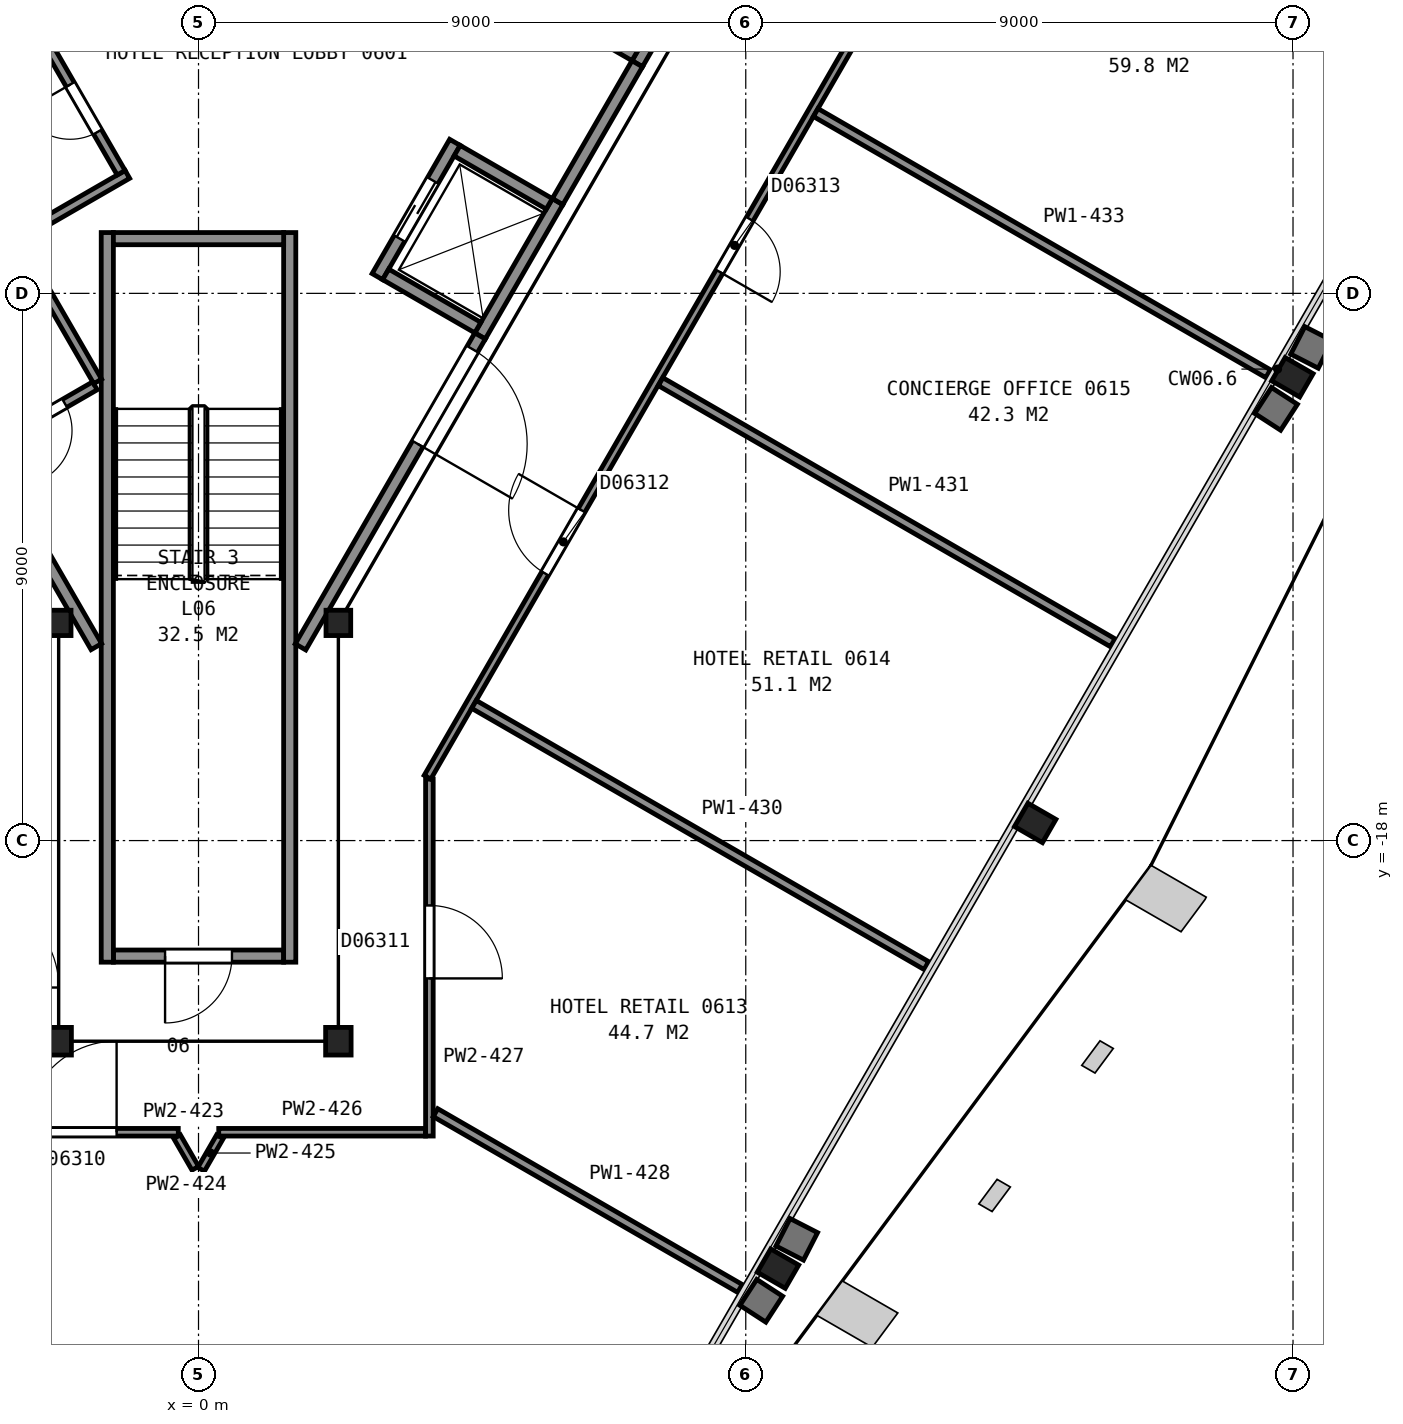
"""IFC4 building model, lengths in metres.
Left out: names, types, materials, properties, quantities, classifications, styles, units other than length and angle.
Written with IfcOpenShell. Run it as: python <this file> out.ifc"""

import sys

from ifc_helpers import new_model, si_unit, direction, frame, frame_2d, origin, origin_2d, place, context, subcontext, project, spatial, rectangle, i_section, extrude, element, fill, save


model = new_model("IFC4")
c1 = context("Model", 3, precision=1e-05, world=origin(), true_north=direction((0.0, 1.0)))
c2 = subcontext(c1, "Body", "Model", "MODEL_VIEW")
j1 = project(units=[si_unit("LENGTHUNIT", "METRE"), si_unit("PLANEANGLEUNIT", "RADIAN")], contexts=[c1])
p1 = place(None, origin())
s1 = spatial("IfcSite", under=j1, at=p1, CompositionType="ELEMENT")
p2 = place(p1, origin())
s2 = spatial("IfcBuilding", under=s1, at=p2, CompositionType="ELEMENT")
p3 = place(p2, frame((0.0, 0.0, 36.8)))
s3 = spatial("IfcBuildingStorey", under=s2, at=p3, CompositionType="ELEMENT", Elevation=36.8)
p4 = place(p3, frame((9.53, -25.04, 0.03), z_axis=(0.0, 0.0, 1.0), x_axis=(-0.5, -0.866025403784, 0.0)))
e1 = element("IfcColumn", 1, at=p4, inside=s3, PredefinedType="COLUMN", context=c2, shape_type="SweptSolid", body=[
    extrude(i_section(OverallWidth=0.442, OverallDepth=0.531, WebThickness=0.066, FlangeThickness=0.106, FilletRadius=0.015, at=origin_2d()), origin(), (0.0, 0.0, 1.0), 3.57),
])
for number, where, z_axis, x_axis in (
    (2, (13.76, -17.71, 0.025), (0.0, 0.0, 1.0), (-0.5, -0.866, 0.0)),
    (3, (17.99, -10.38, 0.025), (0.0, 0.0, 1.0), (-0.5, -0.866, 0.0)),
):
    element("IfcColumn", number, at=place(p3, frame(where, z_axis=z_axis, x_axis=x_axis)), inside=s3, PredefinedType="COLUMN", context=c2, shape_type="SweptSolid", body=[
        extrude(i_section(OverallWidth=0.442, OverallDepth=0.531, WebThickness=0.066, FlangeThickness=0.106, FilletRadius=0.015, at=origin_2d()), origin(), (0.0, 0.0, 1.0), 3.575),
    ])
p5 = place(p3, frame((-2.3, -14.42, 0.0), z_axis=(0.0, 0.0, 1.0), x_axis=(1.0, 0.0, 0.0)))
e4 = element("IfcColumn", 4, at=p5, inside=s3, PredefinedType="COLUMN", context=c2, shape_type="SweptSolid", body=[
    extrude(i_section(OverallWidth=0.406, OverallDepth=0.417, WebThickness=0.03, FlangeThickness=0.048, FilletRadius=0.015, at=origin_2d()), origin(), (0.0, 0.0, 1.0), 3.6),
])
for number, where, z_axis, x_axis in (
    (5, (-2.3, -21.3, 0.0), (0.0, 0.0, 1.0), (-1.0, 0.0, 0.0)),
    (6, (2.3, -21.3, 0.0), (0.0, 0.0, 1.0), (-1.0, 0.0, 0.0)),
):
    element("IfcColumn", number, at=place(p3, frame(where, z_axis=z_axis, x_axis=x_axis)), inside=s3, PredefinedType="COLUMN", context=c2, shape_type="SweptSolid", body=[
        extrude(i_section(OverallWidth=0.419, OverallDepth=0.455, WebThickness=0.042, FlangeThickness=0.068, FilletRadius=0.015, at=origin_2d()), origin(), (0.0, 0.0, 1.0), 3.6),
    ])
p6 = place(p3, frame((2.3, -14.42, 0.0), z_axis=(0.0, 0.0, 1.0), x_axis=(1.0, 0.0, 0.0)))
e7 = element("IfcColumn", 7, at=p6, inside=s3, PredefinedType="COLUMN", context=c2, shape_type="SweptSolid", body=[
    extrude(i_section(OverallWidth=0.406, OverallDepth=0.417, WebThickness=0.03, FlangeThickness=0.048, FilletRadius=0.015, at=origin_2d()), origin(), (0.0, 0.0, 1.0), 3.6),
])
p7 = place(p3, frame((-1.4, -19.9, 0.0), z_axis=(0.0, 0.0, 1.0), x_axis=(1.0, 0.0, 0.0)))
e8 = element("IfcWall", 8, at=p7, inside=s3, PredefinedType="PARTITIONING", context=c2, shape_type="SweptSolid", body=[
    extrude(rectangle(XDim=2.8, YDim=0.2, at=frame_2d((1.4, 0.0))), origin(), (0.0, 0.0, 1.0), 3.35),
])
p8 = place(p7, frame((0.85, 0.0, 0.0)))
e9 = element("IfcOpeningElement", 9, at=p8, cuts=e8, PredefinedType="OPENING", context=c2, shape_type="SweptSolid", body=[
    extrude(rectangle(XDim=1.1, YDim=2.1, at=frame_2d((0.55, 1.05))), frame((0.0, 0.11, 0.0), z_axis=(0.0, -1.0, 0.0), x_axis=(1.0, 0.0, 0.0)), (0.0, 0.0, 1.0), 0.22),
])
for number, where, z_axis, x_axis in (
    (10, (1.5, -8.0, 0.0), (0.0, 0.0, 1.0), (0.0, -1.0, 0.0)),
    (11, (-1.5, -8.0, 0.0), (0.0, 0.0, 1.0), (0.0, -1.0, 0.0)),
):
    element("IfcWall", number, at=place(p3, frame(where, z_axis=z_axis, x_axis=x_axis)), inside=s3, PredefinedType="PARTITIONING", context=c2, shape_type="SweptSolid", body=[
        extrude(rectangle(XDim=12.0, YDim=0.2, at=frame_2d((6.0, 0.0))), origin(), (0.0, 0.0, 1.0), 3.35),
    ])
p9 = place(p3, frame((-1.4, -8.1, 0.0), z_axis=(0.0, 0.0, 1.0), x_axis=(1.0, 0.0, 0.0)))
e12 = element("IfcWall", 12, at=p9, inside=s3, PredefinedType="PARTITIONING", context=c2, shape_type="SweptSolid", body=[
    extrude(rectangle(XDim=2.8, YDim=0.2, at=frame_2d((1.4, 0.0))), origin(), (0.0, 0.0, 1.0), 3.35),
])
p10 = place(p3, frame((4.63, -9.7, 0.0), z_axis=(0.0, 0.0, 1.0), x_axis=(0.500062241894, 0.865989465428, 0.0)))
e13 = element("IfcWall", 13, at=p10, inside=s3, PredefinedType="PARTITIONING", context=c2, shape_type="SweptSolid", body=[
    extrude(rectangle(XDim=2.55, YDim=0.2, at=frame_2d((1.275, 0.0))), origin(), (0.0, 0.0, 1.0), 3.6),
])
p11 = place(p3, frame((7.216, -5.222, 0.0), z_axis=(0.0, 0.0, 1.0), x_axis=(0.499990435942, 0.866030925526, 0.0)))
e14 = element("IfcWall", 14, at=p11, inside=s3, PredefinedType="PARTITIONING", context=c2, shape_type="SweptSolid", body=[
    extrude(rectangle(XDim=2.55, YDim=0.2, at=frame_2d((1.275, 0.0))), origin(), (0.0, 0.0, 1.0), 3.6),
])
p12 = place(p3, frame((2.942, -8.725, 0.0), z_axis=(0.0, 0.0, 1.0), x_axis=(0.500020783669, 0.866013403995, 0.0)))
e15 = element("IfcWall", 15, at=p12, inside=s3, PredefinedType="PARTITIONING", context=c2, shape_type="SweptSolid", body=[
    extrude(rectangle(XDim=2.55, YDim=0.2, at=frame_2d((1.275, 0.0))), origin(), (0.0, 0.0, 1.0), 3.6),
])
p13 = place(p12, frame((0.725, 0.0, 0.0)))
e16 = element("IfcOpeningElement", 16, at=p13, cuts=e15, PredefinedType="OPENING", context=c2, shape_type="SweptSolid", body=[
    extrude(rectangle(XDim=1.1, YDim=2.1, at=frame_2d((0.55, 1.05))), frame((0.0, 0.11, 0.0), z_axis=(0.0, -1.0, 0.0), x_axis=(1.0, 0.0, 0.0)), (0.0, 0.0, 1.0), 0.22),
])
p14 = place(p3, frame((7.179, -5.086, 0.0), z_axis=(0.0, 0.0, 1.0), x_axis=(-0.866036909293, 0.499980071345, 0.0)))
e17 = element("IfcWall", 17, at=p14, inside=s3, PredefinedType="PARTITIONING", context=c2, shape_type="SweptSolid", body=[
    extrude(rectangle(XDim=1.75, YDim=0.2, at=frame_2d((0.875, 0.0))), origin(), (0.0, 0.0, 1.0), 3.6),
])
p15 = place(p3, frame((5.769, -7.528, 0.0), z_axis=(0.0, 0.0, 1.0), x_axis=(-0.866002029911, 0.500040482552, 0.0)))
e18 = element("IfcWall", 18, at=p15, inside=s3, PredefinedType="PARTITIONING", context=c2, shape_type="SweptSolid", body=[
    extrude(rectangle(XDim=1.75, YDim=0.2, at=frame_2d((0.875, 0.0))), origin(), (0.0, 0.0, 1.0), 3.6),
])
p16 = place(p3, frame((4.594, -9.563, 0.0), z_axis=(0.0, 0.0, 1.0), x_axis=(-0.866036909293, 0.499980071345, 0.0)))
e19 = element("IfcWall", 19, at=p16, inside=s3, PredefinedType="PARTITIONING", context=c2, shape_type="SweptSolid", body=[
    extrude(rectangle(XDim=1.75, YDim=0.2, at=frame_2d((0.875, 0.0))), origin(), (0.0, 0.0, 1.0), 3.6),
])
p17 = place(p3, frame((-13.664, 5.946, 0.0), z_axis=(0.0, 0.0, 1.0), x_axis=(0.499994327219, -0.866028678941, 0.0)))
e20 = element("IfcWall", 20, at=p17, inside=s3, PredefinedType="PARTITIONING", context=c2, shape_type="SweptSolid", body=[
    extrude(rectangle(XDim=23.968, YDim=0.2, at=frame_2d((11.984, 0.0))), origin(), (0.0, 0.0, 1.0), 3.35),
])
p18 = place(p3, frame((-4.825, -9.154, 0.0), z_axis=(0.0, 0.0, 1.0), x_axis=(0.866023738697, 0.500002884005, 0.0)))
e21 = element("IfcWall", 21, at=p18, inside=s3, PredefinedType="PARTITIONING", context=c2, shape_type="SweptSolid", body=[
    extrude(rectangle(XDim=4.22, YDim=0.15, at=frame_2d((2.11, 0.0))), origin(), (0.0, 0.0, 1.0), 3.35),
])
p19 = place(p3, frame((-3.456, -11.533, 0.0), z_axis=(0.0, 0.0, 1.0), x_axis=(0.866000843773, 0.500042536776, 0.0)))
e22 = element("IfcWall", 22, at=p19, inside=s3, PredefinedType="PARTITIONING", context=c2, shape_type="SweptSolid", body=[
    extrude(rectangle(XDim=2.025, YDim=0.15, at=frame_2d((1.012, 0.0))), origin(), (0.0, 0.0, 1.0), 3.35),
])
p20 = place(p19, frame((0.55, 0.0, 0.0)))
e23 = element("IfcOpeningElement", 23, at=p20, cuts=e22, PredefinedType="OPENING", context=c2, shape_type="SweptSolid", body=[
    extrude(rectangle(XDim=0.9, YDim=2.1, at=frame_2d((0.45, 1.05))), frame((0.0, 0.085, 0.0), z_axis=(0.0, -1.0, 0.0), x_axis=(1.0, 0.0, 0.0)), (0.0, 0.0, 1.0), 0.17),
])
p21 = place(p3, frame((-2.875, -8.34, 0.0), z_axis=(0.0, 0.0, 1.0), x_axis=(0.500118864444, -0.865956766488, 0.0)))
e24 = element("IfcWall", 24, at=p21, inside=s3, PredefinedType="PARTITIONING", context=c2, shape_type="SweptSolid", body=[
    extrude(rectangle(XDim=2.435, YDim=0.15, at=frame_2d((1.217, 0.0))), origin(), (0.0, 0.0, 1.0), 3.35),
])
p22 = place(p3, frame((-1.272, -7.016, 0.0), z_axis=(0.0, 0.0, 1.0), x_axis=(-0.500045362686, 0.865999212041, 0.0)))
e25 = element("IfcWall", 25, at=p22, inside=s3, PredefinedType="PARTITIONING", context=c2, shape_type="SweptSolid", body=[
    extrude(rectangle(XDim=2.4, YDim=0.15, at=frame_2d((1.2, 0.0))), origin(), (0.0, 0.0, 1.0), 3.35),
])
p23 = place(p22, frame((0.775, 0.0, 0.0)))
e26 = element("IfcOpeningElement", 26, at=p23, cuts=e25, PredefinedType="OPENING", context=c2, shape_type="SweptSolid", body=[
    extrude(rectangle(XDim=0.9, YDim=2.1, at=frame_2d((0.45, 1.05))), frame((0.0, 0.085, 0.0), z_axis=(0.0, -1.0, 0.0), x_axis=(1.0, 0.0, 0.0)), (0.0, 0.0, 1.0), 0.17),
])
p24 = place(p3, frame((1.677, -14.815, 0.0), z_axis=(0.0, 0.0, 1.0), x_axis=(0.49999445743, 0.866028603765, 0.0)))
e27 = element("IfcWall", 27, at=p24, inside=s3, PredefinedType="PARTITIONING", context=c2, shape_type="SweptSolid", body=[
    extrude(rectangle(XDim=5.905, YDim=0.2, at=frame_2d((2.952, 0.0))), origin(), (0.0, 0.0, 1.0), 3.35),
])
p25 = place(p24, frame((3.855, 0.0, 0.0)))
e28 = element("IfcOpeningElement", 28, at=p25, cuts=e27, PredefinedType="OPENING", context=c2, shape_type="SweptSolid", body=[
    extrude(rectangle(XDim=1.8, YDim=2.1, at=frame_2d((0.9, 1.05))), frame((0.0, 0.11, 0.0), z_axis=(0.0, -1.0, 0.0), x_axis=(1.0, 0.0, 0.0)), (0.0, 0.0, 1.0), 0.22),
])
p26 = place(p3, frame((5.906, -7.49, 0.0), z_axis=(0.0, 0.0, 1.0), x_axis=(0.500252727967, 0.865879442048, 0.0)))
e29 = element("IfcWall", 29, at=p26, inside=s3, PredefinedType="PARTITIONING", context=c2, shape_type="SweptSolid", body=[
    extrude(rectangle(XDim=2.617, YDim=0.2, at=frame_2d((1.309, 0.0))), origin(), (0.0, 0.0, 1.0), 3.35),
])
p27 = place(p3, frame((-0.333, -22.797, 0.0), z_axis=(0.0, 0.0, 1.0), x_axis=(-1.0, 0.0, 0.0)))
e30 = element("IfcWall", 30, at=p27, inside=s3, PredefinedType="PARTITIONING", context=c2, shape_type="SweptSolid", body=[
    extrude(rectangle(XDim=3.399, YDim=0.125, at=frame_2d((1.7, 0.0))), origin(), (0.0, 0.0, 1.0), 2.613),
])
p28 = place(p27, frame((1.014, 0.0, 0.0)))
e31 = element("IfcOpeningElement", 31, at=p28, cuts=e30, PredefinedType="OPENING", context=c2, shape_type="SweptSolid", body=[
    extrude(rectangle(XDim=1.5, YDim=2.1, at=frame_2d((0.75, 1.05))), frame((0.0, 0.073, 0.0), z_axis=(0.0, -1.0, 0.0), x_axis=(1.0, 0.0, 0.0)), (0.0, 0.0, 1.0), 0.145),
])
p29 = place(p3, frame((-0.353, -22.871, 0.0), z_axis=(0.0, 0.0, 1.0), x_axis=(0.499863517517, -0.866104187645, 0.0)))
e32 = element("IfcWall", 32, at=p29, inside=s3, PredefinedType="PARTITIONING", context=c2, shape_type="SweptSolid", body=[
    extrude(rectangle(XDim=0.599, YDim=0.125, at=frame_2d((0.3, 0.0))), origin(), (0.0, 0.0, 1.0), 2.613),
])
p30 = place(p3, frame((0.043, -23.407, 0.0), z_axis=(0.0, 0.0, 1.0), x_axis=(0.499870333213, 0.866100253997, 0.0)))
e33 = element("IfcWall", 33, at=p30, inside=s3, PredefinedType="PARTITIONING", context=c2, shape_type="SweptSolid", body=[
    extrude(rectangle(XDim=0.619, YDim=0.125, at=frame_2d((0.31, 0.0))), origin(), (0.0, 0.0, 1.0), 2.613),
])
p31 = place(p3, frame((0.333, -22.797, 0.0), z_axis=(0.0, 0.0, 1.0), x_axis=(1.0, 0.0, 0.0)))
e34 = element("IfcWall", 34, at=p31, inside=s3, PredefinedType="PARTITIONING", context=c2, shape_type="SweptSolid", body=[
    extrude(rectangle(XDim=3.399, YDim=0.125, at=frame_2d((1.7, 0.0))), origin(), (0.0, 0.0, 1.0), 2.613),
])
p32 = place(p3, frame((3.797, -16.989, 0.0), z_axis=(0.0, 0.0, 1.0), x_axis=(0.0, -1.0, 0.0)))
e35 = element("IfcWall", 35, at=p32, inside=s3, PredefinedType="PARTITIONING", context=c2, shape_type="SweptSolid", body=[
    extrude(rectangle(XDim=5.871, YDim=0.125, at=frame_2d((2.935, 0.0))), origin(), (0.0, 0.0, 1.0), 2.613),
])
p33 = place(p32, frame((2.078, 0.0, 0.0)))
e36 = element("IfcOpeningElement", 36, at=p33, cuts=e35, PredefinedType="OPENING", context=c2, shape_type="SweptSolid", body=[
    extrude(rectangle(XDim=1.2, YDim=2.1, at=frame_2d((0.6, 1.05))), frame((0.0, 0.073, 0.0), z_axis=(0.0, -1.0, 0.0), x_axis=(1.0, 0.0, 0.0)), (0.0, 0.0, 1.0), 0.145),
])
p34 = place(p3, frame((3.897, -22.475, 0.0), z_axis=(0.0, 0.0, 1.0), x_axis=(0.866025977343, -0.499999006567, 0.0)))
e37 = element("IfcWall", 37, at=p34, inside=s3, PredefinedType="PARTITIONING", context=c2, shape_type="SweptSolid", body=[
    extrude(rectangle(XDim=5.782, YDim=0.15, at=frame_2d((2.891, 0.0))), origin(), (0.0, 0.0, 1.0), 2.613),
])
p35 = place(p3, frame((16.967, 5.906, 0.0), z_axis=(0.0, 0.0, 1.0), x_axis=(-0.500024758804, -0.866011108811, 0.0)))
e38 = element("IfcWall", 38, at=p35, inside=s3, PredefinedType="PARTITIONING", context=c2, shape_type="SweptSolid", body=[
    extrude(rectangle(XDim=26.402, YDim=0.125, at=frame_2d((13.201, 0.0))), origin(), (0.0, 0.0, 1.0), 2.613),
])
p36 = place(p35, frame((21.332, 0.0, 0.0)))
e39 = element("IfcOpeningElement", 39, at=p36, cuts=e38, PredefinedType="OPENING", context=c2, shape_type="SweptSolid", body=[
    extrude(rectangle(XDim=1.2, YDim=2.1, at=frame_2d((0.6, 1.05))), frame((0.0, 0.073, 0.0), z_axis=(0.0, -1.0, 0.0), x_axis=(1.0, 0.0, 0.0)), (0.0, 0.0, 1.0), 0.145),
])
p37 = place(p35, frame((15.801, 0.0, 0.0)))
e40 = element("IfcOpeningElement", 40, at=p37, cuts=e38, PredefinedType="OPENING", context=c2, shape_type="SweptSolid", body=[
    extrude(rectangle(XDim=1.0, YDim=2.1, at=frame_2d((0.5, 1.05))), frame((0.0, 0.073, 0.0), z_axis=(0.0, -1.0, 0.0), x_axis=(1.0, 0.0, 0.0)), (0.0, 0.0, 1.0), 0.145),
])
p38 = place(p35, frame((9.642, 0.0, 0.0)))
e41 = element("IfcOpeningElement", 41, at=p38, cuts=e38, PredefinedType="OPENING", context=c2, shape_type="SweptSolid", body=[
    extrude(rectangle(XDim=1.0, YDim=2.1, at=frame_2d((0.5, 1.05))), frame((0.0, 0.073, 0.0), z_axis=(0.0, -1.0, 0.0), x_axis=(1.0, 0.0, 0.0)), (0.0, 0.0, 1.0), 0.145),
])
p39 = place(p35, frame((2.839, 0.0, 0.0)))
e42 = element("IfcOpeningElement", 42, at=p39, cuts=e38, PredefinedType="OPENING", context=c2, shape_type="SweptSolid", body=[
    extrude(rectangle(XDim=1.0, YDim=2.1, at=frame_2d((0.5, 1.05))), frame((0.0, 0.073, 0.0), z_axis=(0.0, -1.0, 0.0), x_axis=(1.0, 0.0, 0.0)), (0.0, 0.0, 1.0), 0.145),
])
p40 = place(p3, frame((4.53, -15.76, 0.0), z_axis=(0.0, 0.0, 1.0), x_axis=(0.866029425019, -0.499993034952, 0.0)))
e43 = element("IfcWall", 43, at=p40, inside=s3, PredefinedType="PARTITIONING", context=c2, shape_type="SweptSolid", body=[
    extrude(rectangle(XDim=8.591, YDim=0.15, at=frame_2d((4.296, 0.0))), origin(), (0.0, 0.0, 1.0), 2.613),
])
p41 = place(p3, frame((7.599, -10.453, 0.0), z_axis=(0.0, 0.0, 1.0), x_axis=(0.865982457891, -0.500074377092, 0.0)))
e44 = element("IfcWall", 44, at=p41, inside=s3, PredefinedType="PARTITIONING", context=c2, shape_type="SweptSolid", body=[
    extrude(rectangle(XDim=8.587, YDim=0.15, at=frame_2d((4.293, 0.0))), origin(), (0.0, 0.0, 1.0), 2.613),
])
p42 = place(p3, frame((10.15, -6.026, 0.0), z_axis=(0.0, 0.0, 1.0), x_axis=(0.866041729639, -0.499971721724, 0.0)))
e45 = element("IfcWall", 45, at=p42, inside=s3, PredefinedType="PARTITIONING", context=c2, shape_type="SweptSolid", body=[
    extrude(rectangle(XDim=8.591, YDim=0.15, at=frame_2d((4.296, 0.0))), origin(), (0.0, 0.0, 1.0), 2.613),
])
p43 = place(p8, origin())
e46 = element("IfcDoor", 46, at=p43, inside=s3, OperationType="SINGLE_SWING_LEFT", PredefinedType="DOOR", context=c2, shape_type="SweptSolid", body=[
    extrude(rectangle(XDim=1.1, YDim=2.1, at=frame_2d((0.55, 1.05))), frame((0.0, 0.025, 0.0), z_axis=(0.0, -1.0, 0.0), x_axis=(1.0, 0.0, 0.0)), (0.0, 0.0, 1.0), 0.05),
])
fill(e9, e46)
p44 = place(p13, origin())
e47 = element("IfcDoor", 47, at=p44, inside=s3, OperationType="SLIDING_TO_RIGHT", PredefinedType="DOOR", context=c2, shape_type="SweptSolid", body=[
    extrude(rectangle(XDim=1.1, YDim=2.1, at=frame_2d((0.55, 1.05))), frame((0.0, 0.025, 0.0), z_axis=(0.0, -1.0, 0.0), x_axis=(1.0, 0.0, 0.0)), (0.0, 0.0, 1.0), 0.05),
])
fill(e16, e47)
p45 = place(p20, origin())
e48 = element("IfcDoor", 48, at=p45, inside=s3, OperationType="SINGLE_SWING_LEFT", PredefinedType="DOOR", context=c2, shape_type="SweptSolid", body=[
    extrude(rectangle(XDim=0.9, YDim=2.1, at=frame_2d((0.45, 1.05))), frame((0.0, 0.025, 0.0), z_axis=(0.0, -1.0, 0.0), x_axis=(1.0, 0.0, 0.0)), (0.0, 0.0, 1.0), 0.05),
])
fill(e23, e48)
p46 = place(p23, origin())
e49 = element("IfcDoor", 49, at=p46, inside=s3, OperationType="SINGLE_SWING_RIGHT", PredefinedType="DOOR", context=c2, shape_type="SweptSolid", body=[
    extrude(rectangle(XDim=0.9, YDim=2.1, at=frame_2d((0.45, 1.05))), frame((0.0, 0.025, 0.0), z_axis=(0.0, -1.0, 0.0), x_axis=(1.0, 0.0, 0.0)), (0.0, 0.0, 1.0), 0.05),
])
fill(e26, e49)
p47 = place(p25, origin())
e50 = element("IfcDoor", 50, at=p47, inside=s3, OperationType="DOUBLE_DOOR_SINGLE_SWING", PredefinedType="DOOR", context=c2, shape_type="SweptSolid", body=[
    extrude(rectangle(XDim=1.8, YDim=2.1, at=frame_2d((0.9, 1.05))), frame((0.0, 0.025, 0.0), z_axis=(0.0, -1.0, 0.0), x_axis=(1.0, 0.0, 0.0)), (0.0, 0.0, 1.0), 0.05),
])
fill(e28, e50)
p48 = place(p28, origin())
e51 = element("IfcDoor", 51, at=p48, inside=s3, OperationType="DOUBLE_DOOR_SINGLE_SWING", PredefinedType="DOOR", context=c2, shape_type="SweptSolid", body=[
    extrude(rectangle(XDim=1.5, YDim=2.1, at=frame_2d((0.75, 1.05))), frame((0.0, 0.025, 0.0), z_axis=(0.0, -1.0, 0.0), x_axis=(1.0, 0.0, 0.0)), (0.0, 0.0, 1.0), 0.05),
])
fill(e31, e51)
p49 = place(p33, origin())
e52 = element("IfcDoor", 52, at=p49, inside=s3, OperationType="SINGLE_SWING_RIGHT", PredefinedType="DOOR", context=c2, shape_type="SweptSolid", body=[
    extrude(rectangle(XDim=1.2, YDim=2.1, at=frame_2d((0.6, 1.05))), frame((0.0, 0.025, 0.0), z_axis=(0.0, -1.0, 0.0), x_axis=(1.0, 0.0, 0.0)), (0.0, 0.0, 1.0), 0.05),
])
fill(e36, e52)
p50 = place(p36, origin())
e53 = element("IfcDoor", 53, at=p50, inside=s3, OperationType="SINGLE_SWING_LEFT", PredefinedType="DOOR", context=c2, shape_type="SweptSolid", body=[
    extrude(rectangle(XDim=1.2, YDim=2.1, at=frame_2d((0.6, 1.05))), frame((0.0, 0.025, 0.0), z_axis=(0.0, -1.0, 0.0), x_axis=(1.0, 0.0, 0.0)), (0.0, 0.0, 1.0), 0.05),
])
fill(e39, e53)
p51 = place(p37, origin())
e54 = element("IfcDoor", 54, at=p51, inside=s3, OperationType="SINGLE_SWING_RIGHT", PredefinedType="DOOR", context=c2, shape_type="SweptSolid", body=[
    extrude(rectangle(XDim=1.0, YDim=2.1, at=frame_2d((0.5, 1.05))), frame((0.0, 0.025, 0.0), z_axis=(0.0, -1.0, 0.0), x_axis=(1.0, 0.0, 0.0)), (0.0, 0.0, 1.0), 0.05),
])
fill(e40, e54)
save(model, sys.argv[1])
